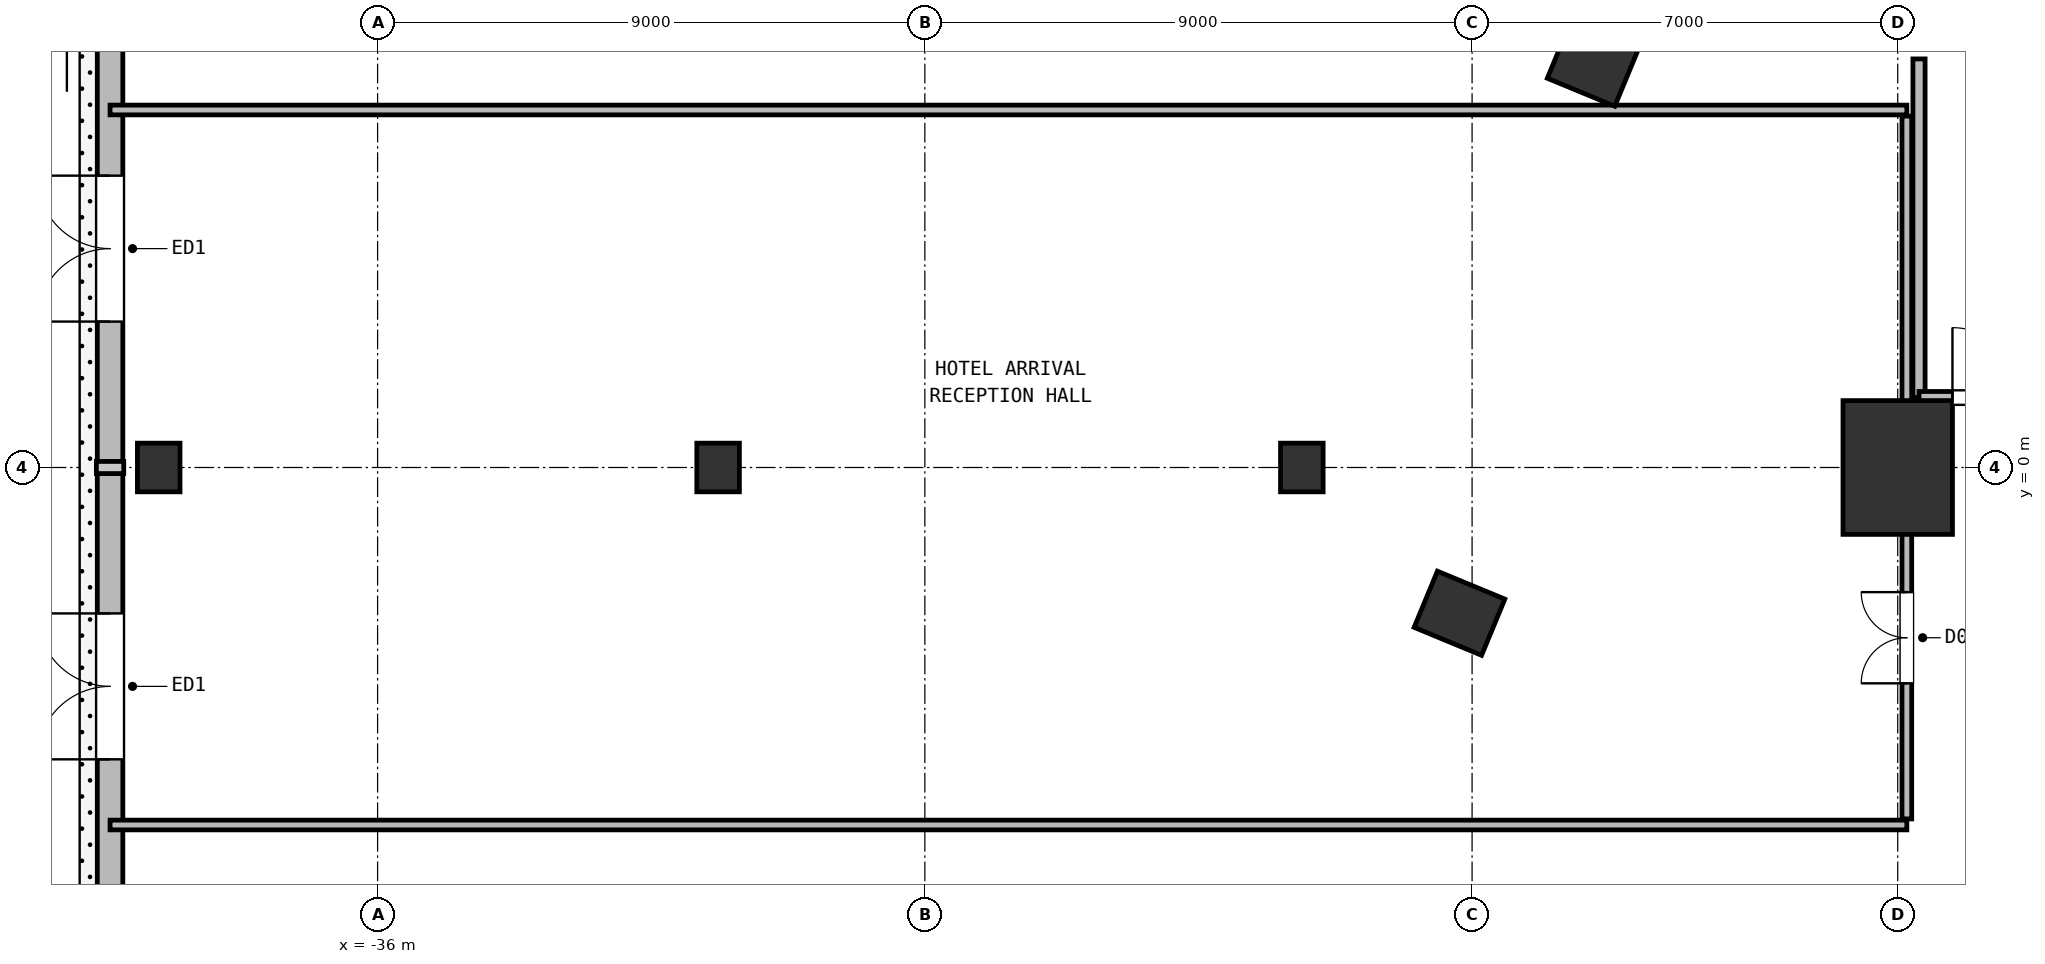
"""IFC4 building model, lengths in metres.
Left out: names, types, materials, properties, quantities, classifications, styles, units other than length and angle.
Written with IfcOpenShell. Run it as: python <this file> out.ifc"""

import sys

from ifc_helpers import new_model, si_unit, direction, frame, frame_2d, origin, origin_2d, place, context, subcontext, project, spatial, rectangle, extrude, element, fill, save


model = new_model("IFC4")
c1 = context("Model", 3, precision=1e-05, world=origin(), true_north=direction((0.0, 1.0)))
c2 = subcontext(c1, "Body", "Model", "MODEL_VIEW")
j1 = project(units=[si_unit("LENGTHUNIT", "METRE"), si_unit("PLANEANGLEUNIT", "RADIAN")], contexts=[c1])
p1 = place(None, origin())
s1 = spatial("IfcSite", under=j1, at=p1, CompositionType="ELEMENT")
p2 = place(p1, origin())
s2 = spatial("IfcBuilding", under=s1, at=p2, CompositionType="ELEMENT")
p3 = place(p2, origin())
s3 = spatial("IfcBuildingStorey", under=s2, at=p3, CompositionType="ELEMENT", Elevation=0.0)
for number, where, z_axis, x_axis in (
    (1, (-16.017, 6.635, 0.0), (0.0, 0.0, 1.0), (0.383, 0.924, 0.0)),
    (2, (-18.207, -2.397, 0.0), (0.0, 0.0, 1.0), (0.383, 0.924, 0.0)),
):
    element("IfcColumn", number, at=place(p3, frame(where, z_axis=z_axis, x_axis=x_axis)), inside=s3, PredefinedType="COLUMN", context=c2, shape_type="SweptSolid", body=[
        extrude(rectangle(XDim=1.0, YDim=1.2, at=origin_2d()), origin(), (0.0, 0.0, 1.0), 6.0),
    ])
for number, where, z_axis, x_axis in (
    (3, (-39.6, 0.0, 0.0), (0.0, 0.0, 1.0), (1.0, 0.0, 0.0)),
    (4, (-30.4, 0.0, 0.0), (0.0, 0.0, 1.0), (1.0, 0.0, 0.0)),
    (5, (-20.8, 0.0, 0.0), (0.0, 0.0, 1.0), (1.0, 0.0, 0.0)),
):
    element("IfcColumn", number, at=place(p3, frame(where, z_axis=z_axis, x_axis=x_axis)), inside=s3, PredefinedType="COLUMN", context=c2, shape_type="SweptSolid", body=[
        extrude(rectangle(XDim=0.7, YDim=0.8, at=origin_2d()), origin(), (0.0, 0.0, 1.0), 6.0),
    ])
p4 = place(p3, frame((-11.0, 0.0, 0.0), z_axis=(0.0, 0.0, 1.0), x_axis=(1.0, 0.0, 0.0)))
e6 = element("IfcColumn", 6, at=p4, inside=s3, PredefinedType="COLUMN", context=c2, shape_type="SweptSolid", body=[
    extrude(rectangle(XDim=1.8, YDim=2.2, at=origin_2d()), origin(), (0.0, 0.0, 1.0), 6.0),
])
p5 = place(p3, frame((-40.4, -17.5, 0.0), z_axis=(0.0, 0.0, 1.0), x_axis=(0.0, 1.0, 0.0)))
e7 = element("IfcWall", 7, at=p5, inside=s3, PredefinedType="SOLIDWALL", context=c2, shape_type="SweptSolid", body=[
    extrude(rectangle(XDim=35.0, YDim=0.42, at=frame_2d((17.5, 0.0))), origin(), (0.0, 0.0, 1.0), 5.1),
])
p6 = place(p5, frame((12.7, 0.0, 0.0)))
e8 = element("IfcOpeningElement", 8, at=p6, cuts=e7, PredefinedType="OPENING", context=c2, shape_type="SweptSolid", body=[
    extrude(rectangle(XDim=2.4, YDim=2.65, at=frame_2d((1.2, 1.325))), frame((0.0, 0.22, 0.0), z_axis=(0.0, -1.0, 0.0), x_axis=(1.0, 0.0, 0.0)), (0.0, 0.0, 1.0), 0.44),
])
p7 = place(p5, frame((19.9, 0.0, 0.0)))
e9 = element("IfcOpeningElement", 9, at=p7, cuts=e7, PredefinedType="OPENING", context=c2, shape_type="SweptSolid", body=[
    extrude(rectangle(XDim=2.4, YDim=2.65, at=frame_2d((1.2, 1.325))), frame((0.0, 0.22, 0.0), z_axis=(0.0, -1.0, 0.0), x_axis=(1.0, 0.0, 0.0)), (0.0, 0.0, 1.0), 0.44),
])
p8 = place(p5, frame((30.35, 0.0, 0.0)))
e10 = element("IfcOpeningElement", 10, at=p8, cuts=e7, PredefinedType="OPENING", context=c2, shape_type="SweptSolid", body=[
    extrude(rectangle(XDim=4.2, YDim=3.2, at=frame_2d((2.1, 1.6))), frame((0.0, 0.22, 0.0), z_axis=(0.0, -1.0, 0.0), x_axis=(1.0, 0.0, 0.0)), (0.0, 0.0, 1.0), 0.44),
])
for number, where, z_axis, x_axis in (
    (11, (-10.85, 5.88, 0.0), (0.0, 0.0, 1.0), (-1.0, 0.0, 0.0)),
    (12, (-40.4, -5.88, 0.0), (0.0, 0.0, 1.0), (1.0, 0.0, 0.0)),
):
    element("IfcWall", number, at=place(p3, frame(where, z_axis=z_axis, x_axis=x_axis)), inside=s3, PredefinedType="PARTITIONING", context=c2, shape_type="SweptSolid", body=[
        extrude(rectangle(XDim=29.55, YDim=0.16, at=frame_2d((14.775, 0.0))), origin(), (0.0, 0.0, 1.0), 5.72),
    ])
p9 = place(p3, frame((-10.85, -5.78, 0.0), z_axis=(0.0, 0.0, 1.0), x_axis=(0.0, 1.0, 0.0)))
e13 = element("IfcWall", 13, at=p9, inside=s3, PredefinedType="PARTITIONING", context=c2, shape_type="SweptSolid", body=[
    extrude(rectangle(XDim=11.56, YDim=0.16, at=frame_2d((5.78, 0.0))), origin(), (0.0, 0.0, 1.0), 5.1),
])
p10 = place(p9, frame((2.23, 0.0, 0.0)))
e14 = element("IfcOpeningElement", 14, at=p10, cuts=e13, PredefinedType="OPENING", context=c2, shape_type="SweptSolid", body=[
    extrude(rectangle(XDim=1.5, YDim=2.2, at=frame_2d((0.75, 1.1))), frame((0.0, 0.09, 0.0), z_axis=(0.0, -1.0, 0.0), x_axis=(1.0, 0.0, 0.0)), (0.0, 0.0, 1.0), 0.18),
])
p11 = place(p3, frame((-10.65, 6.72, 0.0), z_axis=(0.0, 0.0, 1.0), x_axis=(0.0, -1.0, 0.0)))
e15 = element("IfcWall", 15, at=p11, inside=s3, PredefinedType="PARTITIONING", context=c2, shape_type="SweptSolid", body=[
    extrude(rectangle(XDim=5.57, YDim=0.2, at=frame_2d((2.785, 0.0))), origin(), (0.0, 0.0, 1.0), 5.72),
])
p12 = place(p3, frame((-10.65, 1.15, 0.0), z_axis=(0.0, 0.0, 1.0), x_axis=(1.0, 0.0, 0.0)))
e16 = element("IfcWall", 16, at=p12, inside=s3, PredefinedType="PARTITIONING", context=c2, shape_type="SweptSolid", body=[
    extrude(rectangle(XDim=2.25, YDim=0.2, at=frame_2d((1.125, 0.0))), origin(), (0.0, 0.0, 1.0), 5.72),
])
p13 = place(p12, frame((0.55, 0.0, 0.0)))
e17 = element("IfcOpeningElement", 17, at=p13, cuts=e16, PredefinedType="OPENING", context=c2, shape_type="SweptSolid", body=[
    extrude(rectangle(XDim=1.15, YDim=2.15, at=frame_2d((0.575, 1.075))), frame((0.0, 0.11, 0.0), z_axis=(0.0, -1.0, 0.0), x_axis=(1.0, 0.0, 0.0)), (0.0, 0.0, 1.0), 0.22),
])
p14 = place(p6, origin())
e18 = element("IfcDoor", 18, at=p14, inside=s3, OperationType="DOUBLE_DOOR_SINGLE_SWING", PredefinedType="DOOR", context=c2, shape_type="SweptSolid", body=[
    extrude(rectangle(XDim=2.4, YDim=2.65, at=frame_2d((1.2, 1.325))), frame((0.0, 0.025, 0.0), z_axis=(0.0, -1.0, 0.0), x_axis=(1.0, 0.0, 0.0)), (0.0, 0.0, 1.0), 0.05),
])
fill(e8, e18)
p15 = place(p7, origin())
e19 = element("IfcDoor", 19, at=p15, inside=s3, OperationType="DOUBLE_DOOR_SINGLE_SWING", PredefinedType="DOOR", context=c2, shape_type="SweptSolid", body=[
    extrude(rectangle(XDim=2.4, YDim=2.65, at=frame_2d((1.2, 1.325))), frame((0.0, 0.025, 0.0), z_axis=(0.0, -1.0, 0.0), x_axis=(1.0, 0.0, 0.0)), (0.0, 0.0, 1.0), 0.05),
])
fill(e9, e19)
p16 = place(p10, origin())
e20 = element("IfcDoor", 20, at=p16, inside=s3, OperationType="DOUBLE_DOOR_SINGLE_SWING", PredefinedType="DOOR", context=c2, shape_type="SweptSolid", body=[
    extrude(rectangle(XDim=1.5, YDim=2.2, at=frame_2d((0.75, 1.1))), frame((0.0, 0.025, 0.0), z_axis=(0.0, -1.0, 0.0), x_axis=(1.0, 0.0, 0.0)), (0.0, 0.0, 1.0), 0.05),
])
fill(e14, e20)
p17 = place(p13, origin())
e21 = element("IfcDoor", 21, at=p17, inside=s3, OperationType="SINGLE_SWING_LEFT", PredefinedType="DOOR", context=c2, shape_type="SweptSolid", body=[
    extrude(rectangle(XDim=1.15, YDim=2.15, at=frame_2d((0.575, 1.075))), frame((0.0, 0.025, 0.0), z_axis=(0.0, -1.0, 0.0), x_axis=(1.0, 0.0, 0.0)), (0.0, 0.0, 1.0), 0.05),
])
fill(e17, e21)
save(model, sys.argv[1])
